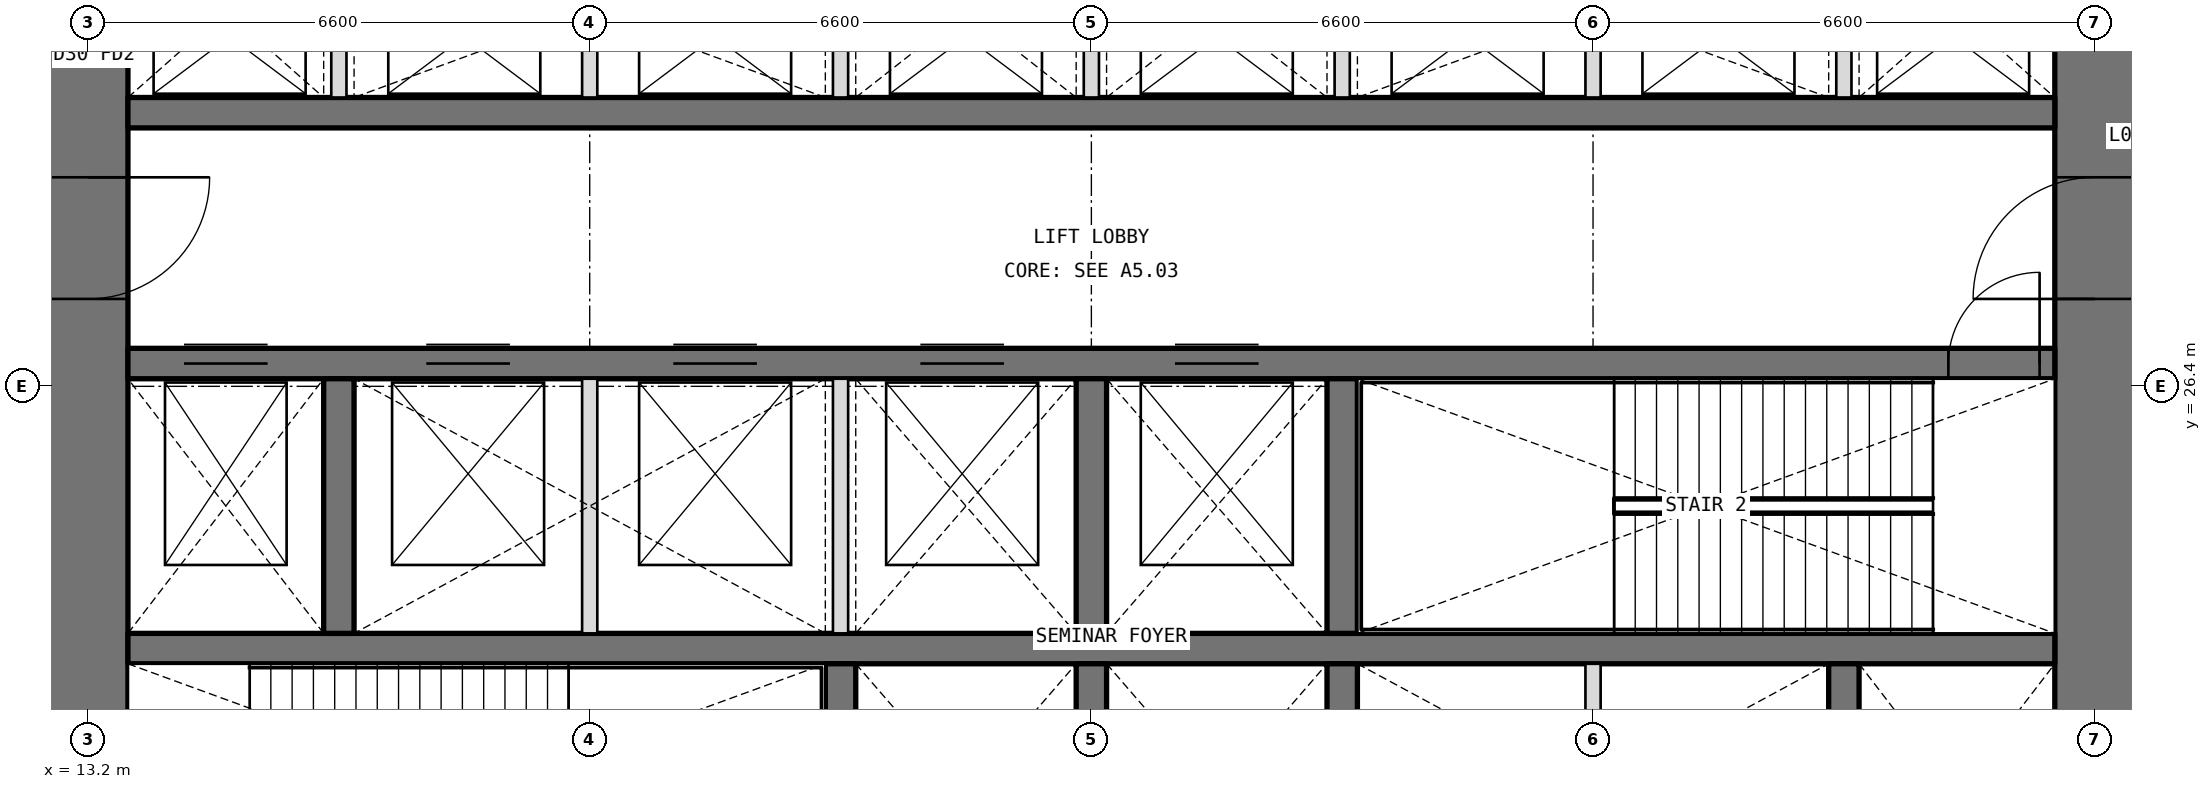
"""IFC4 building model, lengths in metres.
Left out: names, types, materials, properties, quantities, classifications, styles, units other than length and angle.
Written with IfcOpenShell. Run it as: python <this file> out.ifc"""

import sys

from ifc_helpers import new_model, si_unit, direction, frame, frame_2d, origin, place, context, subcontext, project, spatial, rectangle, extrude, element, fill, save


model = new_model("IFC4")
c1 = context("Model", 3, precision=1e-05, world=origin(), true_north=direction((0.0, 1.0)))
c2 = subcontext(c1, "Body", "Model", "MODEL_VIEW")
j1 = project(units=[si_unit("LENGTHUNIT", "METRE"), si_unit("PLANEANGLEUNIT", "RADIAN")], contexts=[c1])
p1 = place(None, origin())
s1 = spatial("IfcSite", under=j1, at=p1, CompositionType="ELEMENT")
p2 = place(p1, origin())
s2 = spatial("IfcBuilding", under=s1, at=p2, CompositionType="ELEMENT")
p3 = place(p2, frame((0.0, 0.0, 7.2)))
s3 = spatial("IfcBuildingStorey", under=s2, at=p3, CompositionType="ELEMENT", Elevation=7.2)
p4 = place(p3, frame((39.6, 13.725, 0.0), z_axis=(0.0, 0.0, 1.0), x_axis=(0.0, 1.0, 0.0)))
e1 = element("IfcWall", 1, at=p4, inside=s3, PredefinedType="SHEAR", context=c2, shape_type="SweptSolid", body=[
    extrude(rectangle(XDim=18.75, YDim=1.05, at=frame_2d((9.375, 0.0))), origin(), (0.0, 0.0, 1.0), 5.4),
])
p5 = place(p4, frame((3.025, 0.0, 0.0)))
e2 = element("IfcOpeningElement", 2, at=p5, cuts=e1, PredefinedType="OPENING", context=c2, shape_type="SweptSolid", body=[
    extrude(rectangle(XDim=1.6, YDim=2.1, at=frame_2d((0.8, 1.05))), frame((0.0, 0.535, 0.0), z_axis=(0.0, -1.0, 0.0), x_axis=(1.0, 0.0, 0.0)), (0.0, 0.0, 1.0), 1.07),
])
p6 = place(p4, frame((13.825, 0.0, 0.0)))
e3 = element("IfcOpeningElement", 3, at=p6, cuts=e1, PredefinedType="OPENING", context=c2, shape_type="SweptSolid", body=[
    extrude(rectangle(XDim=1.6, YDim=2.1, at=frame_2d((0.8, 1.05))), frame((0.0, 0.535, 0.0), z_axis=(0.0, -1.0, 0.0), x_axis=(1.0, 0.0, 0.0)), (0.0, 0.0, 1.0), 1.07),
])
p7 = place(p3, frame((13.2, 32.475, 0.0), z_axis=(0.0, 0.0, 1.0), x_axis=(0.0, -1.0, 0.0)))
e4 = element("IfcWall", 4, at=p7, inside=s3, PredefinedType="SHEAR", context=c2, shape_type="SweptSolid", body=[
    extrude(rectangle(XDim=18.75, YDim=1.05, at=frame_2d((9.375, 0.0))), origin(), (0.0, 0.0, 1.0), 5.4),
])
p8 = place(p7, frame((14.125, 0.0, 0.0)))
e5 = element("IfcOpeningElement", 5, at=p8, cuts=e4, PredefinedType="OPENING", context=c2, shape_type="SweptSolid", body=[
    extrude(rectangle(XDim=1.6, YDim=2.1, at=frame_2d((0.8, 1.05))), frame((0.0, 0.535, 0.0), z_axis=(0.0, -1.0, 0.0), x_axis=(1.0, 0.0, 0.0)), (0.0, 0.0, 1.0), 1.07),
])
p9 = place(p7, frame((3.325, 0.0, 0.0)))
e6 = element("IfcOpeningElement", 6, at=p9, cuts=e4, PredefinedType="OPENING", context=c2, shape_type="SweptSolid", body=[
    extrude(rectangle(XDim=1.6, YDim=2.1, at=frame_2d((0.8, 1.05))), frame((0.0, 0.535, 0.0), z_axis=(0.0, -1.0, 0.0), x_axis=(1.0, 0.0, 0.0)), (0.0, 0.0, 1.0), 1.07),
])
p10 = place(p3, frame((13.725, 22.95, 0.0), z_axis=(0.0, 0.0, 1.0), x_axis=(1.0, 0.0, 0.0)))
e7 = element("IfcWall", 7, at=p10, inside=s3, PredefinedType="SHEAR", context=c2, shape_type="SweptSolid", body=[
    extrude(rectangle(XDim=25.35, YDim=0.4, at=frame_2d((12.675, 0.0))), origin(), (0.0, 0.0, 1.0), 5.4),
])
p11 = place(p3, frame((13.725, 26.7, 0.0), z_axis=(0.0, 0.0, 1.0), x_axis=(1.0, 0.0, 0.0)))
e8 = element("IfcWall", 8, at=p11, inside=s3, PredefinedType="SHEAR", context=c2, shape_type="SweptSolid", body=[
    extrude(rectangle(XDim=25.35, YDim=0.4, at=frame_2d((12.675, 0.0))), origin(), (0.0, 0.0, 1.0), 5.4),
])
p12 = place(p11, frame((23.95, 0.0, 0.0)))
e9 = element("IfcOpeningElement", 9, at=p12, cuts=e8, PredefinedType="OPENING", context=c2, shape_type="SweptSolid", body=[
    extrude(rectangle(XDim=1.2, YDim=2.1, at=frame_2d((0.6, 1.05))), frame((0.0, 0.21, 0.0), z_axis=(0.0, -1.0, 0.0), x_axis=(1.0, 0.0, 0.0)), (0.0, 0.0, 1.0), 0.42),
])
p13 = place(p11, frame((0.738, 0.0, 0.0)))
e10 = element("IfcOpeningElement", 10, at=p13, cuts=e8, PredefinedType="OPENING", context=c2, shape_type="SweptSolid", body=[
    extrude(rectangle(XDim=1.1, YDim=2.1, at=frame_2d((0.55, 1.05))), frame((0.0, 0.21, 0.0), z_axis=(0.0, -1.0, 0.0), x_axis=(1.0, 0.0, 0.0)), (0.0, 0.0, 1.0), 0.42),
])
p14 = place(p11, frame((3.925, 0.0, 0.0)))
e11 = element("IfcOpeningElement", 11, at=p14, cuts=e8, PredefinedType="OPENING", context=c2, shape_type="SweptSolid", body=[
    extrude(rectangle(XDim=1.1, YDim=2.1, at=frame_2d((0.55, 1.05))), frame((0.0, 0.21, 0.0), z_axis=(0.0, -1.0, 0.0), x_axis=(1.0, 0.0, 0.0)), (0.0, 0.0, 1.0), 0.42),
])
p15 = place(p11, frame((7.175, 0.0, 0.0)))
e12 = element("IfcOpeningElement", 12, at=p15, cuts=e8, PredefinedType="OPENING", context=c2, shape_type="SweptSolid", body=[
    extrude(rectangle(XDim=1.1, YDim=2.1, at=frame_2d((0.55, 1.05))), frame((0.0, 0.21, 0.0), z_axis=(0.0, -1.0, 0.0), x_axis=(1.0, 0.0, 0.0)), (0.0, 0.0, 1.0), 0.42),
])
p16 = place(p11, frame((10.425, 0.0, 0.0)))
e13 = element("IfcOpeningElement", 13, at=p16, cuts=e8, PredefinedType="OPENING", context=c2, shape_type="SweptSolid", body=[
    extrude(rectangle(XDim=1.1, YDim=2.1, at=frame_2d((0.55, 1.05))), frame((0.0, 0.21, 0.0), z_axis=(0.0, -1.0, 0.0), x_axis=(1.0, 0.0, 0.0)), (0.0, 0.0, 1.0), 0.42),
])
p17 = place(p11, frame((13.775, 0.0, 0.0)))
e14 = element("IfcOpeningElement", 14, at=p17, cuts=e8, PredefinedType="OPENING", context=c2, shape_type="SweptSolid", body=[
    extrude(rectangle(XDim=1.1, YDim=2.1, at=frame_2d((0.55, 1.05))), frame((0.0, 0.21, 0.0), z_axis=(0.0, -1.0, 0.0), x_axis=(1.0, 0.0, 0.0)), (0.0, 0.0, 1.0), 0.42),
])
p18 = place(p3, frame((13.725, 30.0, 0.0), z_axis=(0.0, 0.0, 1.0), x_axis=(1.0, 0.0, 0.0)))
e15 = element("IfcWall", 15, at=p18, inside=s3, PredefinedType="SHEAR", context=c2, shape_type="SweptSolid", body=[
    extrude(rectangle(XDim=25.35, YDim=0.4, at=frame_2d((12.675, 0.0))), origin(), (0.0, 0.0, 1.0), 5.4),
])
for number, where, z_axis, x_axis in (
    (16, (23.1, 19.4, 0.0), (0.0, 0.0, 1.0), (0.0, 1.0, 0.0)),
    (17, (26.4, 19.4, 0.0), (0.0, 0.0, 1.0), (0.0, 1.0, 0.0)),
    (18, (29.7, 19.4, 0.0), (0.0, 0.0, 1.0), (0.0, 1.0, 0.0)),
    (19, (36.3, 19.4, 0.0), (0.0, 0.0, 1.0), (0.0, 1.0, 0.0)),
    (20, (16.5, 23.15, 0.0), (0.0, 0.0, 1.0), (0.0, 1.0, 0.0)),
    (21, (26.4, 23.15, 0.0), (0.0, 0.0, 1.0), (0.0, 1.0, 0.0)),
    (22, (29.7, 23.15, 0.0), (0.0, 0.0, 1.0), (0.0, 1.0, 0.0)),
):
    element("IfcWall", number, at=place(p3, frame(where, z_axis=z_axis, x_axis=x_axis)), inside=s3, PredefinedType="SHEAR", context=c2, shape_type="SweptSolid", body=[
        extrude(rectangle(XDim=3.35, YDim=0.4, at=frame_2d((1.675, 0.0))), origin(), (0.0, 0.0, 1.0), 5.4),
    ])
for number, where, z_axis, x_axis in (
    (23, (16.5, 30.2, 0.0), (0.0, 0.0, 1.0), (0.0, 1.0, 0.0)),
    (24, (19.8, 30.2, 0.0), (0.0, 0.0, 1.0), (0.0, 1.0, 0.0)),
    (25, (23.1, 30.2, 0.0), (0.0, 0.0, 1.0), (0.0, 1.0, 0.0)),
    (26, (26.4, 30.2, 0.0), (0.0, 0.0, 1.0), (0.0, 1.0, 0.0)),
    (27, (29.7, 30.2, 0.0), (0.0, 0.0, 1.0), (0.0, 1.0, 0.0)),
    (28, (33.0, 30.2, 0.0), (0.0, 0.0, 1.0), (0.0, 1.0, 0.0)),
    (29, (36.3, 30.2, 0.0), (0.0, 0.0, 1.0), (0.0, 1.0, 0.0)),
):
    element("IfcWall", number, at=place(p3, frame(where, z_axis=z_axis, x_axis=x_axis)), inside=s3, PredefinedType="PARTITIONING", context=c2, shape_type="SweptSolid", body=[
        extrude(rectangle(XDim=2.275, YDim=0.2, at=frame_2d((1.138, 0.0))), origin(), (0.0, 0.0, 1.0), 5.4),
    ])
for number, where, z_axis, x_axis in (
    (30, (33.0, 19.4, 0.0), (0.0, 0.0, 1.0), (0.0, 1.0, 0.0)),
    (31, (19.8, 23.15, 0.0), (0.0, 0.0, 1.0), (0.0, 1.0, 0.0)),
    (32, (23.1, 23.15, 0.0), (0.0, 0.0, 1.0), (0.0, 1.0, 0.0)),
):
    element("IfcWall", number, at=place(p3, frame(where, z_axis=z_axis, x_axis=x_axis)), inside=s3, PredefinedType="PARTITIONING", context=c2, shape_type="SweptSolid", body=[
        extrude(rectangle(XDim=3.35, YDim=0.2, at=frame_2d((1.675, 0.0))), origin(), (0.0, 0.0, 1.0), 5.4),
    ])
p19 = place(p12, origin())
e33 = element("IfcDoor", 33, at=p19, inside=s3, OperationType="SINGLE_SWING_RIGHT", PredefinedType="DOOR", context=c2, shape_type="SweptSolid", body=[
    extrude(rectangle(XDim=1.2, YDim=2.1, at=frame_2d((0.6, 1.05))), frame((0.0, 0.025, 0.0), z_axis=(0.0, -1.0, 0.0), x_axis=(1.0, 0.0, 0.0)), (0.0, 0.0, 1.0), 0.05),
])
fill(e9, e33)
p20 = place(p9, origin())
e34 = element("IfcDoor", 34, at=p20, inside=s3, OperationType="DOUBLE_DOOR_DOUBLE_SWING", PredefinedType="DOOR", context=c2, shape_type="SweptSolid", body=[
    extrude(rectangle(XDim=1.6, YDim=2.1, at=frame_2d((0.8, 1.05))), frame((0.0, 0.025, 0.0), z_axis=(0.0, -1.0, 0.0), x_axis=(1.0, 0.0, 0.0)), (0.0, 0.0, 1.0), 0.05),
])
fill(e6, e34)
p21 = place(p6, origin())
e35 = element("IfcDoor", 35, at=p21, inside=s3, OperationType="DOUBLE_DOOR_DOUBLE_SWING", PredefinedType="DOOR", context=c2, shape_type="SweptSolid", body=[
    extrude(rectangle(XDim=1.6, YDim=2.1, at=frame_2d((0.8, 1.05))), frame((0.0, 0.025, 0.0), z_axis=(0.0, -1.0, 0.0), x_axis=(1.0, 0.0, 0.0)), (0.0, 0.0, 1.0), 0.05),
])
fill(e3, e35)
p22 = place(p13, origin())
e36 = element("IfcDoor", 36, at=p22, inside=s3, OperationType="DOUBLE_DOOR_SLIDING", PredefinedType="DOOR", context=c2, shape_type="SweptSolid", body=[
    extrude(rectangle(XDim=1.1, YDim=2.1, at=frame_2d((0.55, 1.05))), frame((0.0, 0.025, 0.0), z_axis=(0.0, -1.0, 0.0), x_axis=(1.0, 0.0, 0.0)), (0.0, 0.0, 1.0), 0.05),
])
fill(e10, e36)
p23 = place(p14, origin())
e37 = element("IfcDoor", 37, at=p23, inside=s3, OperationType="DOUBLE_DOOR_SLIDING", PredefinedType="DOOR", context=c2, shape_type="SweptSolid", body=[
    extrude(rectangle(XDim=1.1, YDim=2.1, at=frame_2d((0.55, 1.05))), frame((0.0, 0.025, 0.0), z_axis=(0.0, -1.0, 0.0), x_axis=(1.0, 0.0, 0.0)), (0.0, 0.0, 1.0), 0.05),
])
fill(e11, e37)
p24 = place(p15, origin())
e38 = element("IfcDoor", 38, at=p24, inside=s3, OperationType="DOUBLE_DOOR_SLIDING", PredefinedType="DOOR", context=c2, shape_type="SweptSolid", body=[
    extrude(rectangle(XDim=1.1, YDim=2.1, at=frame_2d((0.55, 1.05))), frame((0.0, 0.025, 0.0), z_axis=(0.0, -1.0, 0.0), x_axis=(1.0, 0.0, 0.0)), (0.0, 0.0, 1.0), 0.05),
])
fill(e12, e38)
p25 = place(p16, origin())
e39 = element("IfcDoor", 39, at=p25, inside=s3, OperationType="DOUBLE_DOOR_SLIDING", PredefinedType="DOOR", context=c2, shape_type="SweptSolid", body=[
    extrude(rectangle(XDim=1.1, YDim=2.1, at=frame_2d((0.55, 1.05))), frame((0.0, 0.025, 0.0), z_axis=(0.0, -1.0, 0.0), x_axis=(1.0, 0.0, 0.0)), (0.0, 0.0, 1.0), 0.05),
])
fill(e13, e39)
p26 = place(p17, origin())
e40 = element("IfcDoor", 40, at=p26, inside=s3, OperationType="DOUBLE_DOOR_SLIDING", PredefinedType="DOOR", context=c2, shape_type="SweptSolid", body=[
    extrude(rectangle(XDim=1.1, YDim=2.1, at=frame_2d((0.55, 1.05))), frame((0.0, 0.025, 0.0), z_axis=(0.0, -1.0, 0.0), x_axis=(1.0, 0.0, 0.0)), (0.0, 0.0, 1.0), 0.05),
])
fill(e14, e40)
save(model, sys.argv[1])
